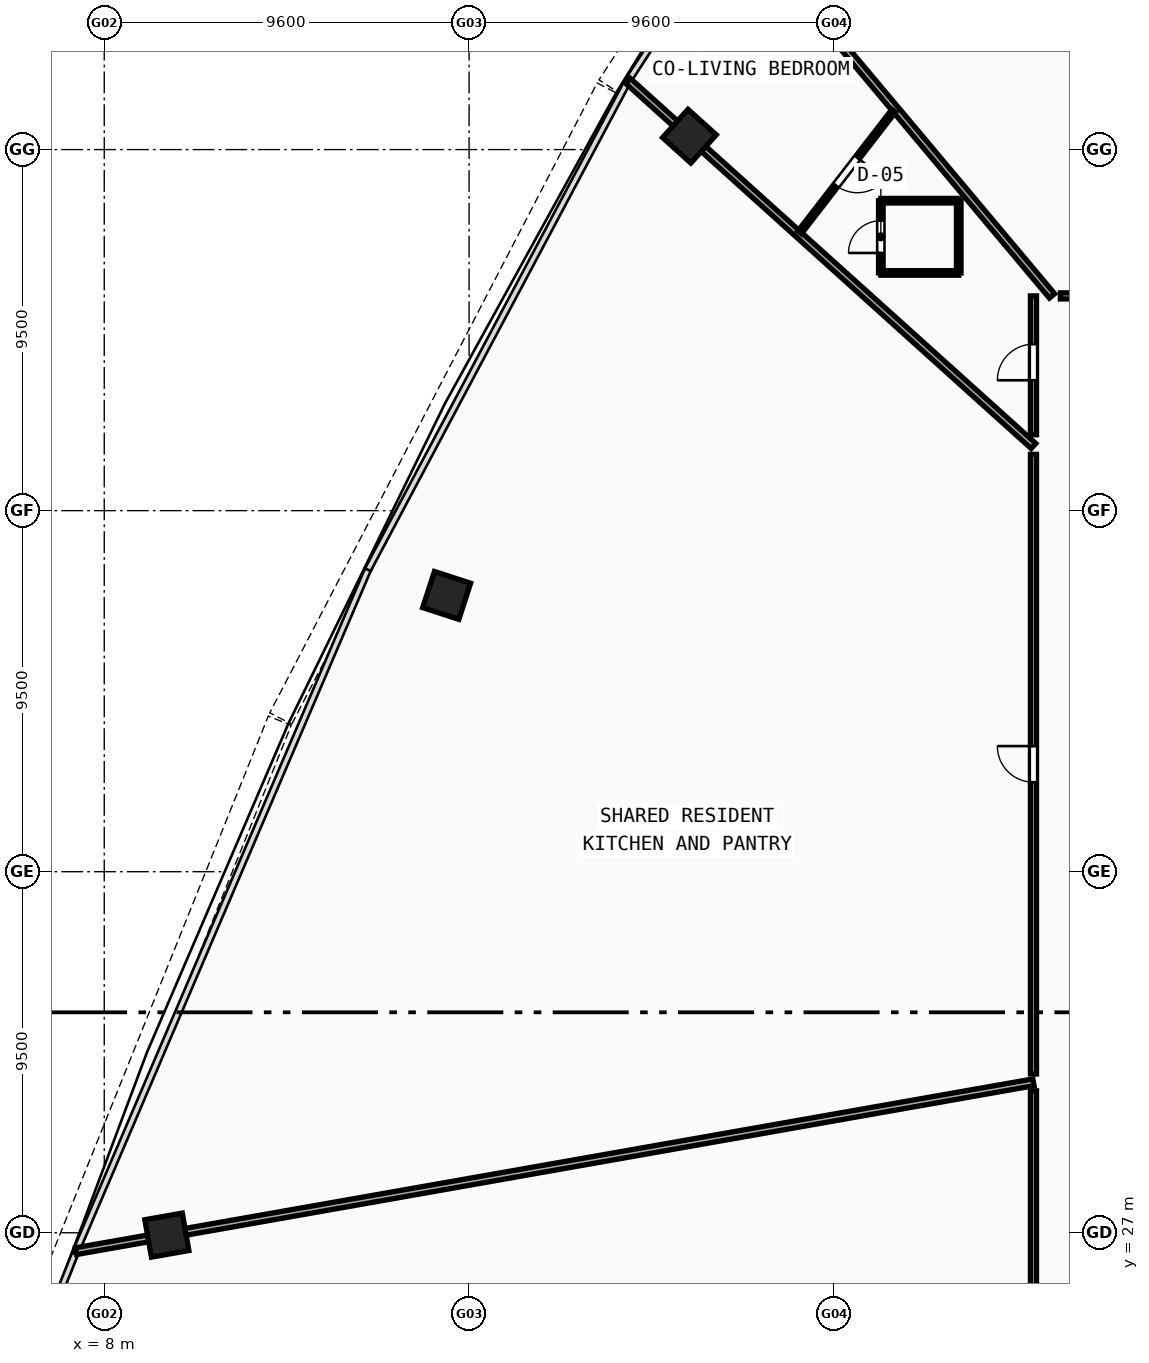
"""IFC4 building model, lengths in metres.
Left out: names, types, materials, properties, quantities, classifications, styles, units other than length and angle.
Written with IfcOpenShell. Run it as: python <this file> out.ifc"""

import sys

from ifc_helpers import new_model, si_unit, direction, frame, frame_2d, origin, origin_with_axes, origin_2d, place, context, subcontext, project, spatial, rectangle, hollow_rectangle, extrude, source, transform, mapped, element, fill, save


model = new_model("IFC4")
c1 = context("Model", 3, precision=1e-05, world=origin(), true_north=direction((0.0, 1.0)))
c2 = subcontext(c1, "Body", "Model", "MODEL_VIEW")
j1 = project(units=[si_unit("LENGTHUNIT", "METRE"), si_unit("PLANEANGLEUNIT", "RADIAN")], contexts=[c1])
p1 = place(None, origin())
s1 = spatial("IfcSite", under=j1, at=p1, CompositionType="ELEMENT")
p2 = place(p1, origin())
s2 = spatial("IfcBuilding", under=s1, at=p2, CompositionType="ELEMENT")
p3 = place(p2, frame((0.0, 0.0, 84.98)))
s3 = spatial("IfcBuildingStorey", under=s2, at=p3, CompositionType="ELEMENT", Elevation=84.98)
m1 = source(origin(), c2, "Body", "SweptSolid", [
    extrude(hollow_rectangle(XDim=1.0, YDim=1.0, WallThickness=0.042, at=origin_2d()), origin(), (0.0, 0.0, 1.0), 3.8),
])
for number, where, z_axis, x_axis in (
    (1, (23.397, 55.852, -0.26), (0.0, 0.0, 1.0), (-0.669, -0.743, 0.0)),
    (2, (17.009, 43.77, -0.26), (0.0, 0.0, 1.0), (-0.309, -0.951, 0.0)),
    (3, (9.647, 26.938, -0.26), (0.0, 0.0, 1.0), (0.174, -0.985, 0.0)),
):
    element("IfcColumn", number, at=place(p3, frame(where, z_axis=z_axis, x_axis=x_axis)), inside=s3, PredefinedType="COLUMN", context=c2, shape_type="MappedRepresentation", body=[
        mapped(m1, transform((0.0, 0.0, 0.0), scale=1.0)),
    ])
p4 = place(p3, frame((40.008, 51.65, 0.0), z_axis=(0.0, 0.0, 1.0), x_axis=(-0.406733854264, 0.913546699296, 0.0)))
e4 = element("IfcWall", 4, at=p4, inside=s3, PredefinedType="PARTITIONING", context=c2, shape_type="SweptSolid", body=[
    extrude(rectangle(XDim=21.911, YDim=0.18, at=frame_2d((10.956, 0.0))), origin(), (0.0, 0.0, 1.0), 2.84),
])
p5 = place(p3, frame((32.938, 51.65, 0.0), z_axis=(0.0, 0.0, 1.0), x_axis=(-0.642792408097, 0.766040416749, 0.0)))
e5 = element("IfcWall", 5, at=p5, inside=s3, PredefinedType="PARTITIONING", context=c2, shape_type="SweptSolid", body=[
    extrude(rectangle(XDim=13.01, YDim=0.18, at=frame_2d((6.505, 0.0))), origin(), (0.0, 0.0, 1.0), 2.84),
])
p6 = place(p3, frame((32.45, 47.701, 0.0), z_axis=(0.0, 0.0, 1.0), x_axis=(-0.743147852162, 0.66912724487, 0.0)))
e6 = element("IfcWall", 6, at=p6, inside=s3, PredefinedType="PARTITIONING", context=c2, shape_type="SweptSolid", body=[
    extrude(rectangle(XDim=14.357, YDim=0.18, at=frame_2d((7.179, 0.0))), origin(), (0.0, 0.0, 1.0), 2.84),
])
p7 = place(p3, frame((32.45, 30.958, 0.0), z_axis=(0.0, 0.0, 1.0), x_axis=(-0.984808048641, -0.173646501066, 0.0)))
e7 = element("IfcWall", 7, at=p7, inside=s3, PredefinedType="PARTITIONING", context=c2, shape_type="SweptSolid", body=[
    extrude(rectangle(XDim=25.582, YDim=0.18, at=frame_2d((12.791, 0.0))), origin(), (0.0, 0.0, 1.0), 2.84),
])
p8 = place(p3, frame((32.45, 24.8, 0.0), z_axis=(0.0, 0.0, 1.0), x_axis=(0.0, 1.0, 0.0)))
e8 = element("IfcWall", 8, at=p8, inside=s3, PredefinedType="PARTITIONING", context=c2, shape_type="SweptSolid", body=[
    extrude(rectangle(XDim=5.935, YDim=0.16, at=frame_2d((2.967, 0.0))), origin(), (0.0, 0.0, 1.0), 3.14),
])
p9 = place(p3, frame((32.45, 31.178, 0.0), z_axis=(0.0, 0.0, 1.0), x_axis=(0.0, 1.0, 0.0)))
e9 = element("IfcWall", 9, at=p9, inside=s3, PredefinedType="PARTITIONING", context=c2, shape_type="SweptSolid", body=[
    extrude(rectangle(XDim=16.304, YDim=0.16, at=frame_2d((8.152, 0.0))), origin(), (0.0, 0.0, 1.0), 2.84),
])
p10 = place(p9, frame((7.677, 0.0, 0.0)))
e10 = element("IfcOpeningElement", 10, at=p10, cuts=e9, PredefinedType="OPENING", context=c2, shape_type="SweptSolid", body=[
    extrude(rectangle(XDim=0.95, YDim=2.1, at=frame_2d((0.475, 1.05))), frame((0.0, 0.09, 0.0), z_axis=(0.0, -1.0, 0.0), x_axis=(1.0, 0.0, 0.0)), (0.0, 0.0, 1.0), 0.18),
])
p11 = place(p3, frame((32.45, 47.997, 0.0), z_axis=(0.0, 0.0, 1.0), x_axis=(0.0, 1.0, 0.0)))
e11 = element("IfcWall", 11, at=p11, inside=s3, PredefinedType="PARTITIONING", context=c2, shape_type="SweptSolid", body=[
    extrude(rectangle(XDim=3.653, YDim=0.16, at=frame_2d((1.826, 0.0))), origin(), (0.0, 0.0, 1.0), 3.54),
])
p12 = place(p11, frame((1.433, 0.0, 0.0)))
e12 = element("IfcOpeningElement", 12, at=p12, cuts=e11, PredefinedType="OPENING", context=c2, shape_type="SweptSolid", body=[
    extrude(rectangle(XDim=0.95, YDim=2.1, at=frame_2d((0.475, 1.05))), frame((0.0, 0.09, 0.0), z_axis=(0.0, -1.0, 0.0), x_axis=(1.0, 0.0, 0.0)), (0.0, 0.0, 1.0), 0.18),
])
p13 = place(p3, frame((33.158, 51.65, 0.0), z_axis=(0.0, 0.0, 1.0), x_axis=(1.0, 0.0, 0.0)))
e13 = element("IfcWall", 13, at=p13, inside=s3, PredefinedType="PARTITIONING", context=c2, shape_type="SweptSolid", body=[
    extrude(rectangle(XDim=6.609, YDim=0.16, at=frame_2d((3.305, 0.0))), origin(), (0.0, 0.0, 1.0), 3.54),
])
p14 = place(p13, frame((2.84, 0.0, 0.0)))
e14 = element("IfcOpeningElement", 14, at=p14, cuts=e13, PredefinedType="OPENING", context=c2, shape_type="SweptSolid", body=[
    extrude(rectangle(XDim=0.95, YDim=2.1, at=frame_2d((0.475, 1.05))), frame((0.0, 0.09, 0.0), z_axis=(0.0, -1.0, 0.0), x_axis=(1.0, 0.0, 0.0)), (0.0, 0.0, 1.0), 0.18),
])
p15 = place(p3, frame((28.434, 52.255, 0.0), z_axis=(0.0, 0.0, 1.0), x_axis=(1.0, 0.0, 0.0)))
e15 = element("IfcWall", 15, at=p15, inside=s3, PredefinedType="PARTITIONING", context=c2, shape_type="SweptSolid", body=[
    extrude(rectangle(XDim=2.05, YDim=0.12, at=frame_2d((1.025, 0.0))), origin(), (0.0, 0.0, 1.0), 3.14),
])
p16 = place(p3, frame((30.484, 52.255, 0.0), z_axis=(0.0, 0.0, 1.0), x_axis=(0.0, 1.0, 0.0)))
e16 = element("IfcWall", 16, at=p16, inside=s3, PredefinedType="PARTITIONING", context=c2, shape_type="SweptSolid", body=[
    extrude(rectangle(XDim=1.9, YDim=0.12, at=frame_2d((0.95, 0.0))), origin(), (0.0, 0.0, 1.0), 3.14),
])
p17 = place(p3, frame((30.484, 54.155, 0.0), z_axis=(0.0, 0.0, 1.0), x_axis=(-1.0, 0.0, 0.0)))
e17 = element("IfcWall", 17, at=p17, inside=s3, PredefinedType="PARTITIONING", context=c2, shape_type="SweptSolid", body=[
    extrude(rectangle(XDim=2.05, YDim=0.12, at=frame_2d((1.025, 0.0))), origin(), (0.0, 0.0, 1.0), 3.54),
])
p18 = place(p3, frame((28.434, 54.155, 0.0), z_axis=(0.0, 0.0, 1.0), x_axis=(0.0, -1.0, 0.0)))
e18 = element("IfcWall", 18, at=p18, inside=s3, PredefinedType="PARTITIONING", context=c2, shape_type="SweptSolid", body=[
    extrude(rectangle(XDim=1.9, YDim=0.12, at=frame_2d((0.95, 0.0))), origin(), (0.0, 0.0, 1.0), 3.54),
])
p19 = place(p18, frame((0.525, 0.0, 0.0)))
e19 = element("IfcOpeningElement", 19, at=p19, cuts=e18, PredefinedType="OPENING", context=c2, shape_type="SweptSolid", body=[
    extrude(rectangle(XDim=0.85, YDim=2.1, at=frame_2d((0.425, 1.05))), frame((0.0, 0.07, 0.0), z_axis=(0.0, -1.0, 0.0), x_axis=(1.0, 0.0, 0.0)), (0.0, 0.0, 1.0), 0.14),
])
p20 = place(p3, frame((28.772, 56.521, 0.0), z_axis=(0.0, 0.0, 1.0), x_axis=(-0.611610665825, -0.791158892669, 0.0)))
e20 = element("IfcWall", 20, at=p20, inside=s3, PredefinedType="PARTITIONING", context=c2, shape_type="SweptSolid", body=[
    extrude(rectangle(XDim=4.045, YDim=0.12, at=frame_2d((2.022, 0.0))), origin(), (0.0, 0.0, 1.0), 2.84),
])
p21 = place(p20, frame((1.562, 0.0, 0.0)))
e21 = element("IfcOpeningElement", 21, at=p21, cuts=e20, PredefinedType="OPENING", context=c2, shape_type="SweptSolid", body=[
    extrude(rectangle(XDim=0.92, YDim=2.1, at=frame_2d((0.46, 1.05))), frame((0.0, 0.07, 0.0), z_axis=(0.0, -1.0, 0.0), x_axis=(1.0, 0.0, 0.0)), (0.0, 0.0, 1.0), 0.14),
])
m2 = source(origin(), c2, "Body", "SweptSolid", [
    extrude(rectangle(XDim=0.95, YDim=2.1, at=frame_2d((0.475, 1.05))), frame((0.0, 0.025, 0.0), z_axis=(0.0, -1.0, 0.0), x_axis=(1.0, 0.0, 0.0)), (0.0, 0.0, 1.0), 0.05),
])
p22 = place(p12, origin_with_axes())
e22 = element("IfcDoor", 22, at=p22, inside=s3, OperationType="SINGLE_SWING_LEFT", PredefinedType="DOOR", context=c2, shape_type="MappedRepresentation", body=[
    mapped(m2, transform((0.0, 0.0, 0.0), scale=1.0)),
])
fill(e12, e22)
m3 = source(origin(), c2, "Body", "SweptSolid", [
    extrude(rectangle(XDim=0.85, YDim=2.1, at=frame_2d((0.425, 1.05))), frame((0.0, 0.025, 0.0), z_axis=(0.0, -1.0, 0.0), x_axis=(1.0, 0.0, 0.0)), (0.0, 0.0, 1.0), 0.05),
])
p23 = place(p19, frame((0.85, 0.0, 0.0), z_axis=(0.0, 0.0, 1.0), x_axis=(-1.0, 0.0, 0.0)))
e23 = element("IfcDoor", 23, at=p23, inside=s3, OperationType="SINGLE_SWING_LEFT", PredefinedType="DOOR", context=c2, shape_type="MappedRepresentation", body=[
    mapped(m3, transform((0.0, 0.0, 0.0), scale=1.0)),
])
fill(e19, e23)
m4 = source(origin(), c2, "Body", "SweptSolid", [
    extrude(rectangle(XDim=0.92, YDim=2.1, at=frame_2d((0.46, 1.05))), frame((0.0, 0.025, 0.0), z_axis=(0.0, -1.0, 0.0), x_axis=(1.0, 0.0, 0.0)), (0.0, 0.0, 1.0), 0.05),
])
p24 = place(p21, origin_with_axes())
e24 = element("IfcDoor", 24, at=p24, inside=s3, OperationType="SINGLE_SWING_LEFT", PredefinedType="DOOR", context=c2, shape_type="MappedRepresentation", body=[
    mapped(m4, transform((0.0, 0.0, 0.0), scale=1.0)),
])
fill(e21, e24)
p25 = place(p10, origin_with_axes())
e25 = element("IfcDoor", 25, at=p25, inside=s3, OperationType="SINGLE_SWING_RIGHT", PredefinedType="DOOR", context=c2, shape_type="MappedRepresentation", body=[
    mapped(m2, transform((0.0, 0.0, 0.0), scale=1.0)),
])
fill(e10, e25)
save(model, sys.argv[1])
